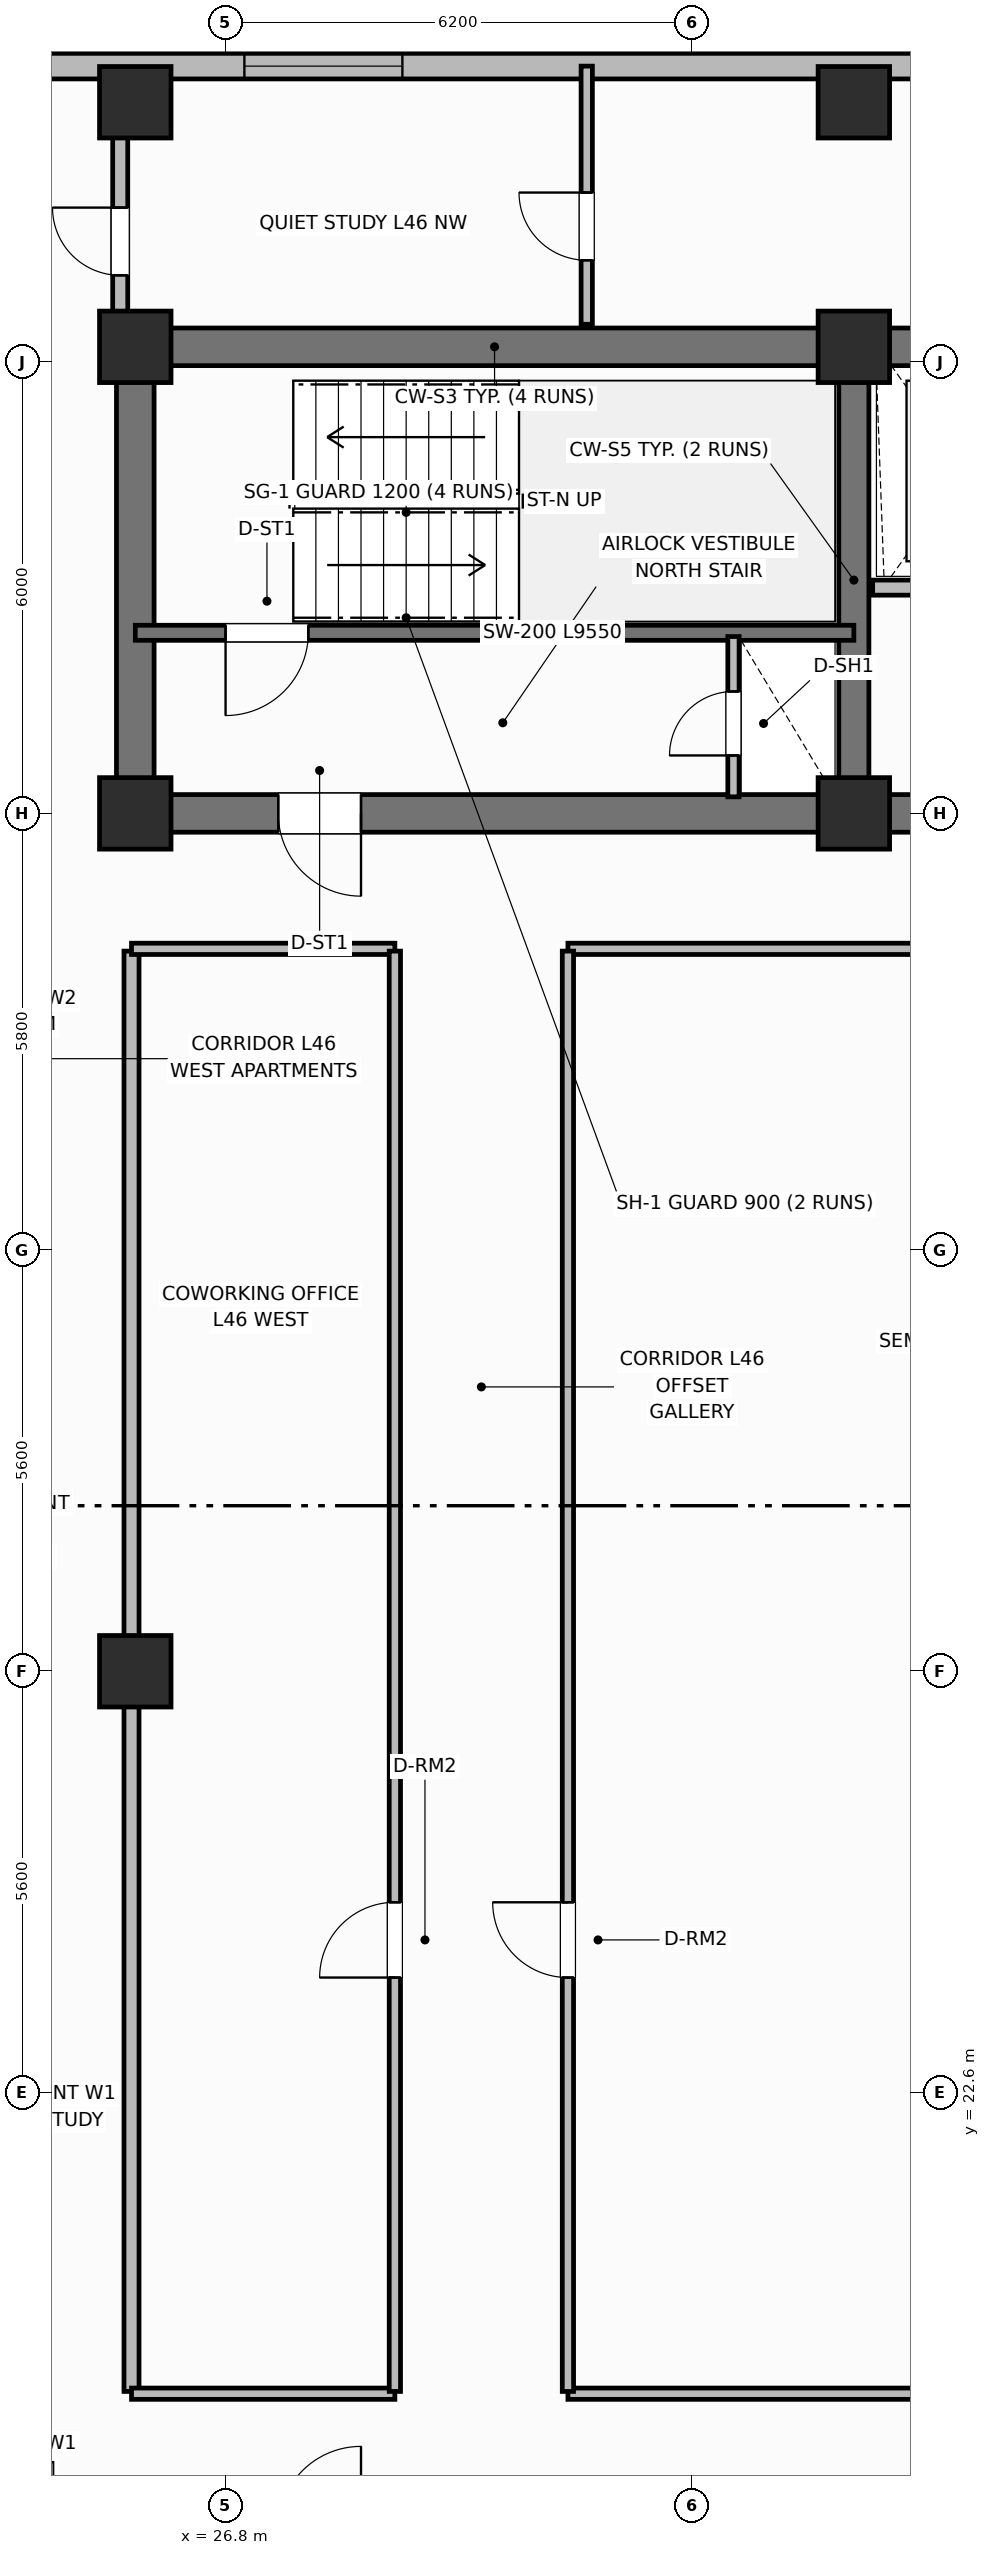
"""IFC4 building model, lengths in metres.
Left out: names, types, materials, properties, quantities, classifications, styles, units other than length and angle.
Written with IfcOpenShell. Run it as: python <this file> out.ifc"""

import sys

from ifc_helpers import new_model, si_unit, direction, frame, frame_2d, origin, origin_2d, place, context, subcontext, project, spatial, rectangle, extrude, element, fill, save


model = new_model("IFC4")
c1 = context("Model", 3, precision=1e-05, world=origin(), true_north=direction((0.0, 1.0)))
c2 = subcontext(c1, "Body", "Model", "MODEL_VIEW")
j1 = project(units=[si_unit("LENGTHUNIT", "METRE"), si_unit("PLANEANGLEUNIT", "RADIAN")], contexts=[c1])
p1 = place(None, origin())
s1 = spatial("IfcSite", under=j1, at=p1, CompositionType="ELEMENT")
p2 = place(p1, origin())
s2 = spatial("IfcBuilding", under=s1, at=p2, CompositionType="ELEMENT")
p3 = place(p2, frame((0.0, 0.0, 184.8)))
s3 = spatial("IfcBuildingStorey", under=s2, at=p3, CompositionType="ELEMENT", Elevation=184.8)
p4 = place(p3, frame((25.6, 45.8, 0.0), z_axis=(0.0, 0.0, 1.0), x_axis=(1.0, 0.0, 0.0)))
e1 = element("IfcWall", 1, at=p4, inside=s3, PredefinedType="SHEAR", context=c2, shape_type="SweptSolid", body=[
    extrude(rectangle(XDim=27.2, YDim=0.5, at=frame_2d((13.6, 0.0))), origin(), (0.0, 0.0, 1.0), 3.7),
])
p5 = place(p3, frame((25.6, 39.85, 0.0), z_axis=(0.0, 0.0, 1.0), x_axis=(0.0, 1.0, 0.0)))
e2 = element("IfcWall", 2, at=p5, inside=s3, PredefinedType="SHEAR", context=c2, shape_type="SweptSolid", body=[
    extrude(rectangle(XDim=5.7, YDim=0.5, at=frame_2d((2.85, 0.0))), origin(), (0.0, 0.0, 1.0), 3.7),
])
p6 = place(p3, frame((52.8, 39.6, 0.0), z_axis=(0.0, 0.0, 1.0), x_axis=(-1.0, 0.0, 0.0)))
e3 = element("IfcWall", 3, at=p6, inside=s3, PredefinedType="SHEAR", context=c2, shape_type="SweptSolid", body=[
    extrude(rectangle(XDim=27.2, YDim=0.5, at=frame_2d((13.6, 0.0))), origin(), (0.0, 0.0, 1.0), 3.7),
])
p7 = place(p6, frame((24.2, 0.0, 0.0)))
e4 = element("IfcOpeningElement", 4, at=p7, cuts=e3, PredefinedType="OPENING", context=c2, shape_type="SweptSolid", body=[
    extrude(rectangle(XDim=1.1, YDim=2.15, at=frame_2d((0.55, 1.075))), frame((0.0, 0.26, 0.0), z_axis=(0.0, -1.0, 0.0), x_axis=(1.0, 0.0, 0.0)), (0.0, 0.0, 1.0), 0.52),
])
p8 = place(p6, frame((15.1, 0.0, 0.0)))
e5 = element("IfcOpeningElement", 5, at=p8, cuts=e3, PredefinedType="OPENING", context=c2, shape_type="SweptSolid", body=[
    extrude(rectangle(XDim=1.2, YDim=2.15, at=frame_2d((0.6, 1.075))), frame((0.0, 0.26, 0.0), z_axis=(0.0, -1.0, 0.0), x_axis=(1.0, 0.0, 0.0)), (0.0, 0.0, 1.0), 0.52),
])
p9 = place(p6, frame((11.6, 0.0, 0.0)))
e6 = element("IfcOpeningElement", 6, at=p9, cuts=e3, PredefinedType="OPENING", context=c2, shape_type="SweptSolid", body=[
    extrude(rectangle(XDim=0.9, YDim=2.1, at=frame_2d((0.45, 1.05))), frame((0.0, 0.26, 0.0), z_axis=(0.0, -1.0, 0.0), x_axis=(1.0, 0.0, 0.0)), (0.0, 0.0, 1.0), 0.52),
])
p10 = place(p6, frame((7.35, 0.0, 0.0)))
e7 = element("IfcOpeningElement", 7, at=p10, cuts=e3, PredefinedType="OPENING", context=c2, shape_type="SweptSolid", body=[
    extrude(rectangle(XDim=0.85, YDim=2.1, at=frame_2d((0.425, 1.05))), frame((0.0, 0.26, 0.0), z_axis=(0.0, -1.0, 0.0), x_axis=(1.0, 0.0, 0.0)), (0.0, 0.0, 1.0), 0.52),
])
p11 = place(p6, frame((3.6, 0.0, 0.0)))
e8 = element("IfcOpeningElement", 8, at=p11, cuts=e3, PredefinedType="OPENING", context=c2, shape_type="SweptSolid", body=[
    extrude(rectangle(XDim=1.0, YDim=2.15, at=frame_2d((0.5, 1.075))), frame((0.0, 0.26, 0.0), z_axis=(0.0, -1.0, 0.0), x_axis=(1.0, 0.0, 0.0)), (0.0, 0.0, 1.0), 0.52),
])
p12 = place(p3, frame((35.15, 39.85, 0.0), z_axis=(0.0, 0.0, 1.0), x_axis=(0.0, 1.0, 0.0)))
e9 = element("IfcWall", 9, at=p12, inside=s3, PredefinedType="SHEAR", context=c2, shape_type="SweptSolid", body=[
    extrude(rectangle(XDim=5.7, YDim=0.4, at=frame_2d((2.85, 0.0))), origin(), (0.0, 0.0, 1.0), 3.7),
])
for number, where, z_axis, x_axis in (
    (10, (25.6, 39.6, 0.0), (0.0, 0.0, 1.0), (1.0, 0.0, 0.0)),
    (11, (25.6, 45.8, 0.0), (0.0, 0.0, 1.0), (1.0, 0.0, 0.0)),
    (12, (35.15, 39.6, 0.0), (0.0, 0.0, 1.0), (1.0, 0.0, 0.0)),
    (13, (35.15, 45.8, 0.0), (0.0, 0.0, 1.0), (1.0, 0.0, 0.0)),
    (14, (25.6, 28.2, 0.0), (0.0, 0.0, 1.0), (1.0, 0.0, 0.0)),
    (15, (25.6, 49.05, 0.0), (0.0, 0.0, 1.0), (1.0, 0.0, 0.0)),
    (16, (35.15, 49.05, 0.0), (0.0, 0.0, 1.0), (1.0, 0.0, 0.0)),
):
    element("IfcColumn", number, at=place(p3, frame(where, z_axis=z_axis, x_axis=x_axis)), inside=s3, PredefinedType="COLUMN", context=c2, shape_type="SweptSolid", body=[
        extrude(rectangle(XDim=0.95, YDim=0.95, at=origin_2d()), origin(), (0.0, 0.0, 1.0), 3.7),
    ])
p13 = place(p3, frame((36.0, 49.53, 0.0), z_axis=(0.0, 0.0, 1.0), x_axis=(-1.0, 0.0, 0.0)))
e17 = element("IfcWall", 17, at=p13, inside=s3, PredefinedType="SOLIDWALL", context=c2, shape_type="SweptSolid", body=[
    extrude(rectangle(XDim=15.8, YDim=0.34, at=frame_2d((7.9, 0.0))), origin(), (0.0, 0.0, 1.0), 2.72),
])
p14 = place(p13, frame((6.85, 0.0, 0.7)))
e18 = element("IfcOpeningElement", 18, at=p14, cuts=e17, PredefinedType="OPENING", context=c2, shape_type="SweptSolid", body=[
    extrude(rectangle(XDim=2.1, YDim=1.9, at=frame_2d((1.05, 0.95))), frame((0.0, 0.18, 0.0), z_axis=(0.0, -1.0, 0.0), x_axis=(1.0, 0.0, 0.0)), (0.0, 0.0, 1.0), 0.36),
])
p15 = place(p3, frame((35.15, 42.0, 0.0), z_axis=(0.0, 0.0, 1.0), x_axis=(-1.0, 0.0, 0.0)))
e19 = element("IfcWall", 19, at=p15, inside=s3, PredefinedType="SHEAR", context=c2, shape_type="SweptSolid", body=[
    extrude(rectangle(XDim=9.55, YDim=0.2, at=frame_2d((4.775, 0.0))), origin(), (0.0, 0.0, 1.0), 3.7),
])
p16 = place(p15, frame((7.25, 0.0, 0.0)))
e20 = element("IfcOpeningElement", 20, at=p16, cuts=e19, PredefinedType="OPENING", context=c2, shape_type="SweptSolid", body=[
    extrude(rectangle(XDim=1.1, YDim=2.15, at=frame_2d((0.55, 1.075))), frame((0.0, 0.11, 0.0), z_axis=(0.0, -1.0, 0.0), x_axis=(1.0, 0.0, 0.0)), (0.0, 0.0, 1.0), 0.22),
])
p17 = place(p3, frame((33.55, 39.82, 0.0), z_axis=(0.0, 0.0, 1.0), x_axis=(0.0, 1.0, 0.0)))
e21 = element("IfcWall", 21, at=p17, inside=s3, PredefinedType="PARTITIONING", context=c2, shape_type="SweptSolid", body=[
    extrude(rectangle(XDim=2.13, YDim=0.15, at=frame_2d((1.065, 0.0))), origin(), (0.0, 0.0, 1.0), 2.55),
])
p18 = place(p17, frame((0.55, 0.0, 0.0)))
e22 = element("IfcOpeningElement", 22, at=p18, cuts=e21, PredefinedType="OPENING", context=c2, shape_type="SweptSolid", body=[
    extrude(rectangle(XDim=0.85, YDim=2.05, at=frame_2d((0.425, 1.025))), frame((0.0, 0.085, 0.0), z_axis=(0.0, -1.0, 0.0), x_axis=(1.0, 0.0, 0.0)), (0.0, 0.0, 1.0), 0.17),
])
p19 = place(p3, frame((37.95, 42.6, 0.0), z_axis=(0.0, 0.0, 1.0), x_axis=(-1.0, 0.0, 0.0)))
e23 = element("IfcWall", 23, at=p19, inside=s3, PredefinedType="PARTITIONING", context=c2, shape_type="SweptSolid", body=[
    extrude(rectangle(XDim=2.55, YDim=0.2, at=frame_2d((1.275, 0.0))), origin(), (0.0, 0.0, 1.0), 2.32),
])
p20 = place(p19, frame((0.75, 0.0, 0.0)))
e24 = element("IfcOpeningElement", 24, at=p20, cuts=e23, PredefinedType="OPENING", context=c2, shape_type="SweptSolid", body=[
    extrude(rectangle(XDim=1.1, YDim=2.15, at=frame_2d((0.55, 1.075))), frame((0.0, 0.11, 0.0), z_axis=(0.0, -1.0, 0.0), x_axis=(1.0, 0.0, 0.0)), (0.0, 0.0, 1.0), 0.22),
])
p21 = place(p3, frame((25.55, 18.63, 0.0), z_axis=(0.0, 0.0, 1.0), x_axis=(0.0, 1.0, 0.0)))
e25 = element("IfcWall", 25, at=p21, inside=s3, PredefinedType="PARTITIONING", context=c2, shape_type="SweptSolid", body=[
    extrude(rectangle(XDim=19.14, YDim=0.2, at=frame_2d((9.57, 0.0))), origin(), (0.0, 0.0, 1.0), 2.55),
])
p22 = place(p3, frame((25.55, 18.6, 0.0), z_axis=(0.0, 0.0, 1.0), x_axis=(1.0, 0.0, 0.0)))
e26 = element("IfcWall", 26, at=p22, inside=s3, PredefinedType="PARTITIONING", context=c2, shape_type="SweptSolid", body=[
    extrude(rectangle(XDim=3.5, YDim=0.15, at=frame_2d((1.75, 0.0))), origin(), (0.0, 0.0, 1.0), 2.55),
])
p23 = place(p3, frame((31.35, 18.6, 0.0), z_axis=(0.0, 0.0, 1.0), x_axis=(1.0, 0.0, 0.0)))
e27 = element("IfcWall", 27, at=p23, inside=s3, PredefinedType="PARTITIONING", context=c2, shape_type="SweptSolid", body=[
    extrude(rectangle(XDim=21.5, YDim=0.15, at=frame_2d((10.75, 0.0))), origin(), (0.0, 0.0, 1.0), 2.55),
])
p24 = place(p3, frame((25.55, 37.8, 0.0), z_axis=(0.0, 0.0, 1.0), x_axis=(1.0, 0.0, 0.0)))
e28 = element("IfcWall", 28, at=p24, inside=s3, PredefinedType="PARTITIONING", context=c2, shape_type="SweptSolid", body=[
    extrude(rectangle(XDim=3.5, YDim=0.15, at=frame_2d((1.75, 0.0))), origin(), (0.0, 0.0, 1.0), 2.55),
])
p25 = place(p3, frame((31.35, 37.8, 0.0), z_axis=(0.0, 0.0, 1.0), x_axis=(1.0, 0.0, 0.0)))
e29 = element("IfcWall", 29, at=p25, inside=s3, PredefinedType="PARTITIONING", context=c2, shape_type="SweptSolid", body=[
    extrude(rectangle(XDim=21.5, YDim=0.15, at=frame_2d((10.75, 0.0))), origin(), (0.0, 0.0, 1.0), 2.55),
])
p26 = place(p3, frame((29.05, 18.63, 0.0), z_axis=(0.0, 0.0, 1.0), x_axis=(0.0, 1.0, 0.0)))
e30 = element("IfcWall", 30, at=p26, inside=s3, PredefinedType="PARTITIONING", context=c2, shape_type="SweptSolid", body=[
    extrude(rectangle(XDim=19.14, YDim=0.15, at=frame_2d((9.57, 0.0))), origin(), (0.0, 0.0, 1.0), 2.55),
])
p27 = place(p26, frame((5.5, 0.0, 0.0)))
e31 = element("IfcOpeningElement", 31, at=p27, cuts=e30, PredefinedType="OPENING", context=c2, shape_type="SweptSolid", body=[
    extrude(rectangle(XDim=1.0, YDim=2.15, at=frame_2d((0.5, 1.075))), frame((0.0, 0.085, 0.0), z_axis=(0.0, -1.0, 0.0), x_axis=(1.0, 0.0, 0.0)), (0.0, 0.0, 1.0), 0.17),
])
p28 = place(p3, frame((31.35, 18.63, 0.0), z_axis=(0.0, 0.0, 1.0), x_axis=(0.0, 1.0, 0.0)))
e32 = element("IfcWall", 32, at=p28, inside=s3, PredefinedType="PARTITIONING", context=c2, shape_type="SweptSolid", body=[
    extrude(rectangle(XDim=19.14, YDim=0.15, at=frame_2d((9.57, 0.0))), origin(), (0.0, 0.0, 1.0), 2.55),
])
p29 = place(p28, frame((5.5, 0.0, 0.0)))
e33 = element("IfcOpeningElement", 33, at=p29, cuts=e32, PredefinedType="OPENING", context=c2, shape_type="SweptSolid", body=[
    extrude(rectangle(XDim=1.0, YDim=2.15, at=frame_2d((0.5, 1.075))), frame((0.0, 0.085, 0.0), z_axis=(0.0, -1.0, 0.0), x_axis=(1.0, 0.0, 0.0)), (0.0, 0.0, 1.0), 0.17),
])
p30 = place(p3, frame((31.6, 46.1, 0.0), z_axis=(0.0, 0.0, 1.0), x_axis=(0.0, 1.0, 0.0)))
e34 = element("IfcWall", 34, at=p30, inside=s3, PredefinedType="PARTITIONING", context=c2, shape_type="SweptSolid", body=[
    extrude(rectangle(XDim=3.43, YDim=0.15, at=frame_2d((1.715, 0.0))), origin(), (0.0, 0.0, 1.0), 2.55),
])
p31 = place(p30, frame((0.85, 0.0, 0.0)))
e35 = element("IfcOpeningElement", 35, at=p31, cuts=e34, PredefinedType="OPENING", context=c2, shape_type="SweptSolid", body=[
    extrude(rectangle(XDim=0.9, YDim=2.1, at=frame_2d((0.45, 1.05))), frame((0.0, 0.085, 0.0), z_axis=(0.0, -1.0, 0.0), x_axis=(1.0, 0.0, 0.0)), (0.0, 0.0, 1.0), 0.17),
])
p32 = place(p3, frame((25.4, 46.1, 0.0), z_axis=(0.0, 0.0, 1.0), x_axis=(0.0, 1.0, 0.0)))
e36 = element("IfcWall", 36, at=p32, inside=s3, PredefinedType="PARTITIONING", context=c2, shape_type="SweptSolid", body=[
    extrude(rectangle(XDim=2.68, YDim=0.2, at=frame_2d((1.34, 0.0))), origin(), (0.0, 0.0, 1.0), 2.55),
])
p33 = place(p32, frame((0.65, 0.0, 0.0)))
e37 = element("IfcOpeningElement", 37, at=p33, cuts=e36, PredefinedType="OPENING", context=c2, shape_type="SweptSolid", body=[
    extrude(rectangle(XDim=0.9, YDim=2.1, at=frame_2d((0.45, 1.05))), frame((0.0, 0.11, 0.0), z_axis=(0.0, -1.0, 0.0), x_axis=(1.0, 0.0, 0.0)), (0.0, 0.0, 1.0), 0.22),
])
p34 = place(p14, origin())
e38 = element("IfcWindow", 38, at=p34, inside=s3, PartitioningType="SINGLE_PANEL", PredefinedType="WINDOW", context=c2, shape_type="SweptSolid", body=[
    extrude(rectangle(XDim=2.1, YDim=1.9, at=frame_2d((1.05, 0.95))), frame((0.0, 0.03, 0.0), z_axis=(0.0, -1.0, 0.0), x_axis=(1.0, 0.0, 0.0)), (0.0, 0.0, 1.0), 0.06),
])
fill(e18, e38)
p35 = place(p16, origin())
e39 = element("IfcDoor", 39, at=p35, inside=s3, OperationType="SINGLE_SWING_RIGHT", PredefinedType="DOOR", context=c2, shape_type="SweptSolid", body=[
    extrude(rectangle(XDim=1.1, YDim=2.15, at=frame_2d((0.55, 1.075))), frame((0.0, 0.025, 0.0), z_axis=(0.0, -1.0, 0.0), x_axis=(1.0, 0.0, 0.0)), (0.0, 0.0, 1.0), 0.05),
])
fill(e20, e39)
p36 = place(p18, origin())
e40 = element("IfcDoor", 40, at=p36, inside=s3, OperationType="SINGLE_SWING_LEFT", PredefinedType="TRAPDOOR", context=c2, shape_type="SweptSolid", body=[
    extrude(rectangle(XDim=0.85, YDim=2.05, at=frame_2d((0.425, 1.025))), frame((0.0, 0.025, 0.0), z_axis=(0.0, -1.0, 0.0), x_axis=(1.0, 0.0, 0.0)), (0.0, 0.0, 1.0), 0.05),
])
fill(e22, e40)
p37 = place(p27, origin())
e41 = element("IfcDoor", 41, at=p37, inside=s3, OperationType="SINGLE_SWING_LEFT", PredefinedType="DOOR", context=c2, shape_type="SweptSolid", body=[
    extrude(rectangle(XDim=1.0, YDim=2.15, at=frame_2d((0.5, 1.075))), frame((0.0, 0.025, 0.0), z_axis=(0.0, -1.0, 0.0), x_axis=(1.0, 0.0, 0.0)), (0.0, 0.0, 1.0), 0.05),
])
fill(e31, e41)
p38 = place(p29, origin())
e42 = element("IfcDoor", 42, at=p38, inside=s3, OperationType="SINGLE_SWING_RIGHT", PredefinedType="DOOR", context=c2, shape_type="SweptSolid", body=[
    extrude(rectangle(XDim=1.0, YDim=2.15, at=frame_2d((0.5, 1.075))), frame((0.0, 0.025, 0.0), z_axis=(0.0, -1.0, 0.0), x_axis=(1.0, 0.0, 0.0)), (0.0, 0.0, 1.0), 0.05),
])
fill(e33, e42)
p39 = place(p31, origin())
e43 = element("IfcDoor", 43, at=p39, inside=s3, OperationType="SINGLE_SWING_RIGHT", PredefinedType="DOOR", context=c2, shape_type="SweptSolid", body=[
    extrude(rectangle(XDim=0.9, YDim=2.1, at=frame_2d((0.45, 1.05))), frame((0.0, 0.025, 0.0), z_axis=(0.0, -1.0, 0.0), x_axis=(1.0, 0.0, 0.0)), (0.0, 0.0, 1.0), 0.05),
])
fill(e35, e43)
p40 = place(p33, origin())
e44 = element("IfcDoor", 44, at=p40, inside=s3, OperationType="SINGLE_SWING_RIGHT", PredefinedType="DOOR", context=c2, shape_type="SweptSolid", body=[
    extrude(rectangle(XDim=0.9, YDim=2.1, at=frame_2d((0.45, 1.05))), frame((0.0, 0.025, 0.0), z_axis=(0.0, -1.0, 0.0), x_axis=(1.0, 0.0, 0.0)), (0.0, 0.0, 1.0), 0.05),
])
fill(e37, e44)
p41 = place(p7, origin())
e45 = element("IfcDoor", 45, at=p41, inside=s3, OperationType="SINGLE_SWING_LEFT", PredefinedType="DOOR", context=c2, shape_type="SweptSolid", body=[
    extrude(rectangle(XDim=1.1, YDim=2.15, at=frame_2d((0.55, 1.075))), frame((0.0, 0.025, 0.0), z_axis=(0.0, -1.0, 0.0), x_axis=(1.0, 0.0, 0.0)), (0.0, 0.0, 1.0), 0.05),
])
fill(e4, e45)
save(model, sys.argv[1])
